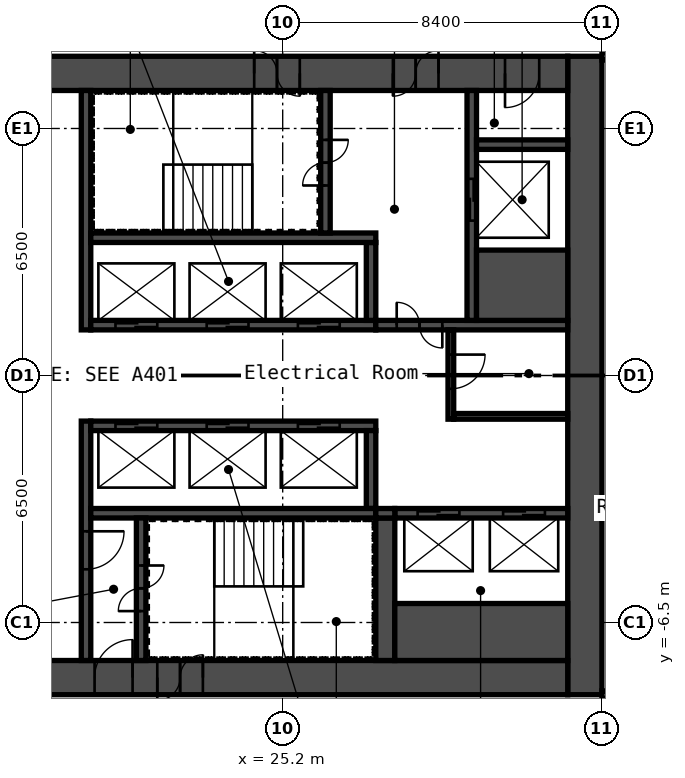
"""IFC4 building model, lengths in metres.
Left out: names, types, materials, properties, quantities, classifications, styles, units other than length and angle.
Written with IfcOpenShell. Run it as: python <this file> out.ifc"""

import sys

from ifc_helpers import new_model, si_unit, direction, frame, frame_2d, origin, place, context, subcontext, project, spatial, rectangle, extrude, element, fill, save


model = new_model("IFC4")
c1 = context("Model", 3, precision=1e-05, world=origin(), true_north=direction((0.0, 1.0)))
c2 = subcontext(c1, "Body", "Model", "MODEL_VIEW")
j1 = project(units=[si_unit("LENGTHUNIT", "METRE"), si_unit("PLANEANGLEUNIT", "RADIAN")], contexts=[c1])
p1 = place(None, origin())
s1 = spatial("IfcSite", under=j1, at=p1, CompositionType="ELEMENT")
p2 = place(p1, origin())
s2 = spatial("IfcBuilding", under=s1, at=p2, CompositionType="ELEMENT")
p3 = place(p2, origin())
s3 = spatial("IfcBuildingStorey", under=s2, at=p3, CompositionType="ELEMENT", Elevation=0.0)
p4 = place(p3, frame((33.15, -8.4, 0.0), z_axis=(0.0, 0.0, 1.0), x_axis=(0.0, 1.0, 0.0)))
e1 = element("IfcWall", 1, at=p4, inside=s3, PredefinedType="SHEAR", context=c2, shape_type="SweptSolid", body=[
    extrude(rectangle(XDim=16.8, YDim=0.9, at=frame_2d((8.4, 0.0))), origin(), (0.0, 0.0, 1.0), 8.6),
])
p5 = place(p3, frame((17.7, 7.95, 0.0), z_axis=(0.0, 0.0, 1.0), x_axis=(1.0, 0.0, 0.0)))
e2 = element("IfcWall", 2, at=p5, inside=s3, PredefinedType="SHEAR", context=c2, shape_type="SweptSolid", body=[
    extrude(rectangle(XDim=15.0, YDim=0.9, at=frame_2d((7.5, 0.0))), origin(), (0.0, 0.0, 1.0), 8.6),
])
p6 = place(p5, frame((10.4, 0.0, 0.0)))
e3 = element("IfcOpeningElement", 3, at=p6, cuts=e2, PredefinedType="OPENING", context=c2, shape_type="SweptSolid", body=[
    extrude(rectangle(XDim=1.2, YDim=2.1, at=frame_2d((0.6, 1.05))), frame((0.0, 0.46, 0.0), z_axis=(0.0, -1.0, 0.0), x_axis=(1.0, 0.0, 0.0)), (0.0, 0.0, 1.0), 0.92),
])
p7 = place(p5, frame((13.35, 0.0, 0.0)))
e4 = element("IfcOpeningElement", 4, at=p7, cuts=e2, PredefinedType="OPENING", context=c2, shape_type="SweptSolid", body=[
    extrude(rectangle(XDim=0.9, YDim=2.1, at=frame_2d((0.45, 1.05))), frame((0.0, 0.46, 0.0), z_axis=(0.0, -1.0, 0.0), x_axis=(1.0, 0.0, 0.0)), (0.0, 0.0, 1.0), 0.92),
])
p8 = place(p5, frame((6.75, 0.0, 0.0)))
e5 = element("IfcOpeningElement", 5, at=p8, cuts=e2, PredefinedType="OPENING", context=c2, shape_type="SweptSolid", body=[
    extrude(rectangle(XDim=1.2, YDim=2.1, at=frame_2d((0.6, 1.05))), frame((0.0, 0.46, 0.0), z_axis=(0.0, -1.0, 0.0), x_axis=(1.0, 0.0, 0.0)), (0.0, 0.0, 1.0), 0.92),
])
p9 = place(p3, frame((17.7, -7.95, 0.0), z_axis=(0.0, 0.0, 1.0), x_axis=(1.0, 0.0, 0.0)))
e6 = element("IfcWall", 6, at=p9, inside=s3, PredefinedType="SHEAR", context=c2, shape_type="SweptSolid", body=[
    extrude(rectangle(XDim=15.0, YDim=0.9, at=frame_2d((7.5, 0.0))), origin(), (0.0, 0.0, 1.0), 8.6),
])
p10 = place(p9, frame((2.55, 0.0, 0.0)))
e7 = element("IfcOpeningElement", 7, at=p10, cuts=e6, PredefinedType="OPENING", context=c2, shape_type="SweptSolid", body=[
    extrude(rectangle(XDim=1.0, YDim=2.1, at=frame_2d((0.5, 1.05))), frame((0.0, 0.46, 0.0), z_axis=(0.0, -1.0, 0.0), x_axis=(1.0, 0.0, 0.0)), (0.0, 0.0, 1.0), 0.92),
])
p11 = place(p9, frame((4.2, 0.0, 0.0)))
e8 = element("IfcOpeningElement", 8, at=p11, cuts=e6, PredefinedType="OPENING", context=c2, shape_type="SweptSolid", body=[
    extrude(rectangle(XDim=1.2, YDim=2.1, at=frame_2d((0.6, 1.05))), frame((0.0, 0.46, 0.0), z_axis=(0.0, -1.0, 0.0), x_axis=(1.0, 0.0, 0.0)), (0.0, 0.0, 1.0), 0.92),
])
p12 = place(p3, frame((20.025, 1.2, 0.0), z_axis=(0.0, 0.0, 1.0), x_axis=(0.0, 1.0, 0.0)))
e9 = element("IfcWall", 9, at=p12, inside=s3, PredefinedType="SHEAR", context=c2, shape_type="SweptSolid", body=[
    extrude(rectangle(XDim=6.3, YDim=0.25, at=frame_2d((3.15, 0.0))), origin(), (0.0, 0.0, 1.0), 8.6),
])
p13 = place(p3, frame((20.025, -7.5, 0.0), z_axis=(0.0, 0.0, 1.0), x_axis=(0.0, 1.0, 0.0)))
e10 = element("IfcWall", 10, at=p13, inside=s3, PredefinedType="SHEAR", context=c2, shape_type="SweptSolid", body=[
    extrude(rectangle(XDim=6.3, YDim=0.25, at=frame_2d((3.15, 0.0))), origin(), (0.0, 0.0, 1.0), 8.6),
])
p14 = place(p13, frame((2.4, 0.0, 0.0)))
e11 = element("IfcOpeningElement", 11, at=p14, cuts=e10, PredefinedType="OPENING", context=c2, shape_type="SweptSolid", body=[
    extrude(rectangle(XDim=1.0, YDim=2.1, at=frame_2d((0.5, 1.05))), frame((0.0, 0.135, 0.0), z_axis=(0.0, -1.0, 0.0), x_axis=(1.0, 0.0, 0.0)), (0.0, 0.0, 1.0), 0.27),
])
p15 = place(p3, frame((20.15, 1.325, 0.0), z_axis=(0.0, 0.0, 1.0), x_axis=(1.0, 0.0, 0.0)))
e12 = element("IfcWall", 12, at=p15, inside=s3, PredefinedType="SHEAR", context=c2, shape_type="SweptSolid", body=[
    extrude(rectangle(XDim=7.5, YDim=0.25, at=frame_2d((3.75, 0.0))), origin(), (0.0, 0.0, 1.0), 8.6),
])
p16 = place(p15, frame((0.65, 0.0, 0.0)))
e13 = element("IfcOpeningElement", 13, at=p16, cuts=e12, PredefinedType="OPENING", context=c2, shape_type="SweptSolid", body=[
    extrude(rectangle(XDim=1.1, YDim=2.1, at=frame_2d((0.55, 1.05))), frame((0.0, 0.135, 0.0), z_axis=(0.0, -1.0, 0.0), x_axis=(1.0, 0.0, 0.0)), (0.0, 0.0, 1.0), 0.27),
])
p17 = place(p15, frame((3.05, 0.0, 0.0)))
e14 = element("IfcOpeningElement", 14, at=p17, cuts=e12, PredefinedType="OPENING", context=c2, shape_type="SweptSolid", body=[
    extrude(rectangle(XDim=1.1, YDim=2.1, at=frame_2d((0.55, 1.05))), frame((0.0, 0.135, 0.0), z_axis=(0.0, -1.0, 0.0), x_axis=(1.0, 0.0, 0.0)), (0.0, 0.0, 1.0), 0.27),
])
p18 = place(p15, frame((5.45, 0.0, 0.0)))
e15 = element("IfcOpeningElement", 15, at=p18, cuts=e12, PredefinedType="OPENING", context=c2, shape_type="SweptSolid", body=[
    extrude(rectangle(XDim=1.1, YDim=2.1, at=frame_2d((0.55, 1.05))), frame((0.0, 0.135, 0.0), z_axis=(0.0, -1.0, 0.0), x_axis=(1.0, 0.0, 0.0)), (0.0, 0.0, 1.0), 0.27),
])
p19 = place(p3, frame((27.525, 1.45, 0.0), z_axis=(0.0, 0.0, 1.0), x_axis=(0.0, 1.0, 0.0)))
e16 = element("IfcWall", 16, at=p19, inside=s3, PredefinedType="SHEAR", context=c2, shape_type="SweptSolid", body=[
    extrude(rectangle(XDim=2.05, YDim=0.25, at=frame_2d((1.025, 0.0))), origin(), (0.0, 0.0, 1.0), 8.6),
])
p20 = place(p3, frame((20.15, 3.625, 0.0), z_axis=(0.0, 0.0, 1.0), x_axis=(1.0, 0.0, 0.0)))
e17 = element("IfcWall", 17, at=p20, inside=s3, PredefinedType="SHEAR", context=c2, shape_type="SweptSolid", body=[
    extrude(rectangle(XDim=7.5, YDim=0.25, at=frame_2d((3.75, 0.0))), origin(), (0.0, 0.0, 1.0), 8.6),
])
p21 = place(p3, frame((26.325, 3.75, 0.0), z_axis=(0.0, 0.0, 1.0), x_axis=(0.0, 1.0, 0.0)))
e18 = element("IfcWall", 18, at=p21, inside=s3, PredefinedType="SHEAR", context=c2, shape_type="SweptSolid", body=[
    extrude(rectangle(XDim=3.75, YDim=0.25, at=frame_2d((1.875, 0.0))), origin(), (0.0, 0.0, 1.0), 8.6),
])
p22 = place(p21, frame((1.25, 0.0, 0.0)))
e19 = element("IfcOpeningElement", 19, at=p22, cuts=e18, PredefinedType="OPENING", context=c2, shape_type="SweptSolid", body=[
    extrude(rectangle(XDim=1.2, YDim=2.1, at=frame_2d((0.6, 1.05))), frame((0.0, 0.135, 0.0), z_axis=(0.0, -1.0, 0.0), x_axis=(1.0, 0.0, 0.0)), (0.0, 0.0, 1.0), 0.27),
])
p23 = place(p3, frame((27.65, 1.325, 0.0), z_axis=(0.0, 0.0, 1.0), x_axis=(1.0, 0.0, 0.0)))
e20 = element("IfcWall", 20, at=p23, inside=s3, PredefinedType="SHEAR", context=c2, shape_type="SweptSolid", body=[
    extrude(rectangle(XDim=5.05, YDim=0.25, at=frame_2d((2.525, 0.0))), origin(), (0.0, 0.0, 1.0), 8.6),
])
p24 = place(p23, frame((0.55, 0.0, 0.0)))
e21 = element("IfcOpeningElement", 21, at=p24, cuts=e20, PredefinedType="OPENING", context=c2, shape_type="SweptSolid", body=[
    extrude(rectangle(XDim=1.2, YDim=2.1, at=frame_2d((0.6, 1.05))), frame((0.0, 0.135, 0.0), z_axis=(0.0, -1.0, 0.0), x_axis=(1.0, 0.0, 0.0)), (0.0, 0.0, 1.0), 0.27),
])
p25 = place(p3, frame((30.175, 1.45, 0.0), z_axis=(0.0, 0.0, 1.0), x_axis=(0.0, 1.0, 0.0)))
e22 = element("IfcWall", 22, at=p25, inside=s3, PredefinedType="SHEAR", context=c2, shape_type="SweptSolid", body=[
    extrude(rectangle(XDim=6.05, YDim=0.25, at=frame_2d((3.025, 0.0))), origin(), (0.0, 0.0, 1.0), 8.6),
])
p26 = place(p25, frame((2.625, 0.0, 0.0)))
e23 = element("IfcOpeningElement", 23, at=p26, cuts=e22, PredefinedType="OPENING", context=c2, shape_type="SweptSolid", body=[
    extrude(rectangle(XDim=1.1, YDim=2.1, at=frame_2d((0.55, 1.05))), frame((0.0, 0.135, 0.0), z_axis=(0.0, -1.0, 0.0), x_axis=(1.0, 0.0, 0.0)), (0.0, 0.0, 1.0), 0.27),
])
p27 = place(p3, frame((30.3, 2.375, 0.0), z_axis=(0.0, 0.0, 1.0), x_axis=(1.0, 0.0, 0.0)))
e24 = element("IfcWall", 24, at=p27, inside=s3, PredefinedType="SHEAR", context=c2, shape_type="SweptSolid", body=[
    extrude(rectangle(XDim=2.4, YDim=1.85, at=frame_2d((1.2, 0.0))), origin(), (0.0, 0.0, 1.0), 8.6),
])
p28 = place(p3, frame((30.3, 6.075, 0.0), z_axis=(0.0, 0.0, 1.0), x_axis=(1.0, 0.0, 0.0)))
e25 = element("IfcWall", 25, at=p28, inside=s3, PredefinedType="SHEAR", context=c2, shape_type="SweptSolid", body=[
    extrude(rectangle(XDim=2.4, YDim=0.25, at=frame_2d((1.2, 0.0))), origin(), (0.0, 0.0, 1.0), 8.6),
])
p29 = place(p3, frame((20.15, -1.325, 0.0), z_axis=(0.0, 0.0, 1.0), x_axis=(1.0, 0.0, 0.0)))
e26 = element("IfcWall", 26, at=p29, inside=s3, PredefinedType="SHEAR", context=c2, shape_type="SweptSolid", body=[
    extrude(rectangle(XDim=7.5, YDim=0.25, at=frame_2d((3.75, 0.0))), origin(), (0.0, 0.0, 1.0), 8.6),
])
p30 = place(p29, frame((0.65, 0.0, 0.0)))
e27 = element("IfcOpeningElement", 27, at=p30, cuts=e26, PredefinedType="OPENING", context=c2, shape_type="SweptSolid", body=[
    extrude(rectangle(XDim=1.1, YDim=2.1, at=frame_2d((0.55, 1.05))), frame((0.0, 0.135, 0.0), z_axis=(0.0, -1.0, 0.0), x_axis=(1.0, 0.0, 0.0)), (0.0, 0.0, 1.0), 0.27),
])
p31 = place(p29, frame((3.05, 0.0, 0.0)))
e28 = element("IfcOpeningElement", 28, at=p31, cuts=e26, PredefinedType="OPENING", context=c2, shape_type="SweptSolid", body=[
    extrude(rectangle(XDim=1.1, YDim=2.1, at=frame_2d((0.55, 1.05))), frame((0.0, 0.135, 0.0), z_axis=(0.0, -1.0, 0.0), x_axis=(1.0, 0.0, 0.0)), (0.0, 0.0, 1.0), 0.27),
])
p32 = place(p29, frame((5.45, 0.0, 0.0)))
e29 = element("IfcOpeningElement", 29, at=p32, cuts=e26, PredefinedType="OPENING", context=c2, shape_type="SweptSolid", body=[
    extrude(rectangle(XDim=1.1, YDim=2.1, at=frame_2d((0.55, 1.05))), frame((0.0, 0.135, 0.0), z_axis=(0.0, -1.0, 0.0), x_axis=(1.0, 0.0, 0.0)), (0.0, 0.0, 1.0), 0.27),
])
p33 = place(p3, frame((27.525, -3.5, 0.0), z_axis=(0.0, 0.0, 1.0), x_axis=(0.0, 1.0, 0.0)))
e30 = element("IfcWall", 30, at=p33, inside=s3, PredefinedType="SHEAR", context=c2, shape_type="SweptSolid", body=[
    extrude(rectangle(XDim=2.05, YDim=0.25, at=frame_2d((1.025, 0.0))), origin(), (0.0, 0.0, 1.0), 8.6),
])
p34 = place(p3, frame((20.15, -3.625, 0.0), z_axis=(0.0, 0.0, 1.0), x_axis=(1.0, 0.0, 0.0)))
e31 = element("IfcWall", 31, at=p34, inside=s3, PredefinedType="SHEAR", context=c2, shape_type="SweptSolid", body=[
    extrude(rectangle(XDim=7.5, YDim=0.25, at=frame_2d((3.75, 0.0))), origin(), (0.0, 0.0, 1.0), 8.6),
])
p35 = place(p3, frame((21.475, -7.5, 0.0), z_axis=(0.0, 0.0, 1.0), x_axis=(0.0, 1.0, 0.0)))
e32 = element("IfcWall", 32, at=p35, inside=s3, PredefinedType="SHEAR", context=c2, shape_type="SweptSolid", body=[
    extrude(rectangle(XDim=3.75, YDim=0.25, at=frame_2d((1.875, 0.0))), origin(), (0.0, 0.0, 1.0), 8.6),
])
p36 = place(p35, frame((1.3, 0.0, 0.0)))
e33 = element("IfcOpeningElement", 33, at=p36, cuts=e32, PredefinedType="OPENING", context=c2, shape_type="SweptSolid", body=[
    extrude(rectangle(XDim=1.2, YDim=2.1, at=frame_2d((0.6, 1.05))), frame((0.0, 0.135, 0.0), z_axis=(0.0, -1.0, 0.0), x_axis=(1.0, 0.0, 0.0)), (0.0, 0.0, 1.0), 0.27),
])
p37 = place(p3, frame((27.9, -7.5, 0.0), z_axis=(0.0, 0.0, 1.0), x_axis=(0.0, 1.0, 0.0)))
e34 = element("IfcWall", 34, at=p37, inside=s3, PredefinedType="SHEAR", context=c2, shape_type="SweptSolid", body=[
    extrude(rectangle(XDim=3.75, YDim=0.5, at=frame_2d((1.875, 0.0))), origin(), (0.0, 0.0, 1.0), 8.6),
])
p38 = place(p3, frame((28.15, -3.625, 0.0), z_axis=(0.0, 0.0, 1.0), x_axis=(1.0, 0.0, 0.0)))
e35 = element("IfcWall", 35, at=p38, inside=s3, PredefinedType="SHEAR", context=c2, shape_type="SweptSolid", body=[
    extrude(rectangle(XDim=4.55, YDim=0.25, at=frame_2d((2.275, 0.0))), origin(), (0.0, 0.0, 1.0), 8.6),
])
p39 = place(p38, frame((0.6, 0.0, 0.0)))
e36 = element("IfcOpeningElement", 36, at=p39, cuts=e35, PredefinedType="OPENING", context=c2, shape_type="SweptSolid", body=[
    extrude(rectangle(XDim=1.1, YDim=2.1, at=frame_2d((0.55, 1.05))), frame((0.0, 0.135, 0.0), z_axis=(0.0, -1.0, 0.0), x_axis=(1.0, 0.0, 0.0)), (0.0, 0.0, 1.0), 0.27),
])
p40 = place(p38, frame((2.85, 0.0, 0.0)))
e37 = element("IfcOpeningElement", 37, at=p40, cuts=e35, PredefinedType="OPENING", context=c2, shape_type="SweptSolid", body=[
    extrude(rectangle(XDim=1.1, YDim=2.1, at=frame_2d((0.55, 1.05))), frame((0.0, 0.135, 0.0), z_axis=(0.0, -1.0, 0.0), x_axis=(1.0, 0.0, 0.0)), (0.0, 0.0, 1.0), 0.27),
])
p41 = place(p3, frame((28.15, -6.75, 0.0), z_axis=(0.0, 0.0, 1.0), x_axis=(1.0, 0.0, 0.0)))
e38 = element("IfcWall", 38, at=p41, inside=s3, PredefinedType="SHEAR", context=c2, shape_type="SweptSolid", body=[
    extrude(rectangle(XDim=4.55, YDim=1.5, at=frame_2d((2.275, 0.0))), origin(), (0.0, 0.0, 1.0), 8.6),
])
p42 = place(p3, frame((27.65, -3.625, 0.0), z_axis=(0.0, 0.0, 1.0), x_axis=(1.0, 0.0, 0.0)))
e39 = element("IfcWall", 39, at=p42, inside=s3, PredefinedType="SHEAR", context=c2, shape_type="SweptSolid", body=[
    extrude(rectangle(XDim=0.5, YDim=0.25, at=frame_2d((0.25, 0.0))), origin(), (0.0, 0.0, 1.0), 8.6),
])
p43 = place(p3, frame((29.625, -1.15, 0.0), z_axis=(0.0, 0.0, 1.0), x_axis=(0.0, 1.0, 0.0)))
e40 = element("IfcWall", 40, at=p43, inside=s3, PredefinedType="PARTITIONING", context=c2, shape_type="SweptSolid", body=[
    extrude(rectangle(XDim=2.35, YDim=0.15, at=frame_2d((1.175, 0.0))), origin(), (0.0, 0.0, 1.0), 8.6),
])
p44 = place(p43, frame((0.8, 0.0, 0.0)))
e41 = element("IfcOpeningElement", 41, at=p44, cuts=e40, PredefinedType="OPENING", context=c2, shape_type="SweptSolid", body=[
    extrude(rectangle(XDim=0.9, YDim=2.1, at=frame_2d((0.45, 1.05))), frame((0.0, 0.085, 0.0), z_axis=(0.0, -1.0, 0.0), x_axis=(1.0, 0.0, 0.0)), (0.0, 0.0, 1.0), 0.17),
])
p45 = place(p3, frame((29.7, -1.075, 0.0), z_axis=(0.0, 0.0, 1.0), x_axis=(1.0, 0.0, 0.0)))
e42 = element("IfcWall", 42, at=p45, inside=s3, PredefinedType="PARTITIONING", context=c2, shape_type="SweptSolid", body=[
    extrude(rectangle(XDim=3.0, YDim=0.15, at=frame_2d((1.5, 0.0))), origin(), (0.0, 0.0, 1.0), 8.6),
])
for number, where, z_axis, x_axis in (
    (43, (33.6, -8.4, 0.0), (0.0, 0.0, 1.0), (1.0, 0.0, 0.0)),
    (44, (39.0, 8.4, 0.0), (0.0, 0.0, 1.0), (-1.0, 0.0, 0.0)),
):
    element("IfcWall", number, at=place(p3, frame(where, z_axis=z_axis, x_axis=x_axis)), inside=s3, PredefinedType="PARTITIONING", context=c2, shape_type="SweptSolid", body=[
        extrude(rectangle(XDim=5.4, YDim=0.2, at=frame_2d((2.7, 0.0))), origin(), (0.0, 0.0, 1.0), 8.6),
    ])
p46 = place(p6, origin())
e45 = element("IfcDoor", 45, at=p46, inside=s3, OperationType="DOUBLE_DOOR_SINGLE_SWING", PredefinedType="DOOR", context=c2, shape_type="SweptSolid", body=[
    extrude(rectangle(XDim=1.2, YDim=2.1, at=frame_2d((0.6, 1.05))), frame((0.0, 0.025, 0.0), z_axis=(0.0, -1.0, 0.0), x_axis=(1.0, 0.0, 0.0)), (0.0, 0.0, 1.0), 0.05),
])
fill(e3, e45)
p47 = place(p7, origin())
e46 = element("IfcDoor", 46, at=p47, inside=s3, OperationType="SINGLE_SWING_LEFT", PredefinedType="DOOR", context=c2, shape_type="SweptSolid", body=[
    extrude(rectangle(XDim=0.9, YDim=2.1, at=frame_2d((0.45, 1.05))), frame((0.0, 0.025, 0.0), z_axis=(0.0, -1.0, 0.0), x_axis=(1.0, 0.0, 0.0)), (0.0, 0.0, 1.0), 0.05),
])
fill(e4, e46)
p48 = place(p10, origin())
e47 = element("IfcDoor", 47, at=p48, inside=s3, OperationType="SINGLE_SWING_LEFT", PredefinedType="DOOR", context=c2, shape_type="SweptSolid", body=[
    extrude(rectangle(XDim=1.0, YDim=2.1, at=frame_2d((0.5, 1.05))), frame((0.0, 0.025, 0.0), z_axis=(0.0, -1.0, 0.0), x_axis=(1.0, 0.0, 0.0)), (0.0, 0.0, 1.0), 0.05),
])
fill(e7, e47)
p49 = place(p8, origin())
e48 = element("IfcDoor", 48, at=p49, inside=s3, OperationType="DOUBLE_DOOR_SINGLE_SWING", PredefinedType="DOOR", context=c2, shape_type="SweptSolid", body=[
    extrude(rectangle(XDim=1.2, YDim=2.1, at=frame_2d((0.6, 1.05))), frame((0.0, 0.025, 0.0), z_axis=(0.0, -1.0, 0.0), x_axis=(1.0, 0.0, 0.0)), (0.0, 0.0, 1.0), 0.05),
])
fill(e5, e48)
p50 = place(p11, frame((1.2, 0.0, 0.0), z_axis=(0.0, 0.0, 1.0), x_axis=(-1.0, 0.0, 0.0)))
e49 = element("IfcDoor", 49, at=p50, inside=s3, OperationType="DOUBLE_DOOR_SINGLE_SWING", PredefinedType="DOOR", context=c2, shape_type="SweptSolid", body=[
    extrude(rectangle(XDim=1.2, YDim=2.1, at=frame_2d((0.6, 1.05))), frame((0.0, 0.025, 0.0), z_axis=(0.0, -1.0, 0.0), x_axis=(1.0, 0.0, 0.0)), (0.0, 0.0, 1.0), 0.05),
])
fill(e8, e49)
p51 = place(p22, origin())
e50 = element("IfcDoor", 50, at=p51, inside=s3, OperationType="DOUBLE_DOOR_SINGLE_SWING", PredefinedType="DOOR", context=c2, shape_type="SweptSolid", body=[
    extrude(rectangle(XDim=1.2, YDim=2.1, at=frame_2d((0.6, 1.05))), frame((0.0, 0.025, 0.0), z_axis=(0.0, -1.0, 0.0), x_axis=(1.0, 0.0, 0.0)), (0.0, 0.0, 1.0), 0.05),
])
fill(e19, e50)
p52 = place(p36, origin())
e51 = element("IfcDoor", 51, at=p52, inside=s3, OperationType="DOUBLE_DOOR_SINGLE_SWING", PredefinedType="DOOR", context=c2, shape_type="SweptSolid", body=[
    extrude(rectangle(XDim=1.2, YDim=2.1, at=frame_2d((0.6, 1.05))), frame((0.0, 0.025, 0.0), z_axis=(0.0, -1.0, 0.0), x_axis=(1.0, 0.0, 0.0)), (0.0, 0.0, 1.0), 0.05),
])
fill(e33, e51)
p53 = place(p14, origin())
e52 = element("IfcDoor", 52, at=p53, inside=s3, OperationType="SINGLE_SWING_RIGHT", PredefinedType="DOOR", context=c2, shape_type="SweptSolid", body=[
    extrude(rectangle(XDim=1.0, YDim=2.1, at=frame_2d((0.5, 1.05))), frame((0.0, 0.025, 0.0), z_axis=(0.0, -1.0, 0.0), x_axis=(1.0, 0.0, 0.0)), (0.0, 0.0, 1.0), 0.05),
])
fill(e11, e52)
p54 = place(p24, origin())
e53 = element("IfcDoor", 53, at=p54, inside=s3, OperationType="DOUBLE_DOOR_SINGLE_SWING", PredefinedType="DOOR", context=c2, shape_type="SweptSolid", body=[
    extrude(rectangle(XDim=1.2, YDim=2.1, at=frame_2d((0.6, 1.05))), frame((0.0, 0.025, 0.0), z_axis=(0.0, -1.0, 0.0), x_axis=(1.0, 0.0, 0.0)), (0.0, 0.0, 1.0), 0.05),
])
fill(e21, e53)
p55 = place(p44, origin())
e54 = element("IfcDoor", 54, at=p55, inside=s3, OperationType="SINGLE_SWING_RIGHT", PredefinedType="DOOR", context=c2, shape_type="SweptSolid", body=[
    extrude(rectangle(XDim=0.9, YDim=2.1, at=frame_2d((0.45, 1.05))), frame((0.0, 0.025, 0.0), z_axis=(0.0, -1.0, 0.0), x_axis=(1.0, 0.0, 0.0)), (0.0, 0.0, 1.0), 0.05),
])
fill(e41, e54)
p56 = place(p16, origin())
e55 = element("IfcDoor", 55, at=p56, inside=s3, OperationType="DOUBLE_DOOR_SLIDING", PredefinedType="DOOR", context=c2, shape_type="SweptSolid", body=[
    extrude(rectangle(XDim=1.1, YDim=2.1, at=frame_2d((0.55, 1.05))), frame((0.0, 0.025, 0.0), z_axis=(0.0, -1.0, 0.0), x_axis=(1.0, 0.0, 0.0)), (0.0, 0.0, 1.0), 0.05),
])
fill(e13, e55)
p57 = place(p17, origin())
e56 = element("IfcDoor", 56, at=p57, inside=s3, OperationType="DOUBLE_DOOR_SLIDING", PredefinedType="DOOR", context=c2, shape_type="SweptSolid", body=[
    extrude(rectangle(XDim=1.1, YDim=2.1, at=frame_2d((0.55, 1.05))), frame((0.0, 0.025, 0.0), z_axis=(0.0, -1.0, 0.0), x_axis=(1.0, 0.0, 0.0)), (0.0, 0.0, 1.0), 0.05),
])
fill(e14, e56)
p58 = place(p18, origin())
e57 = element("IfcDoor", 57, at=p58, inside=s3, OperationType="DOUBLE_DOOR_SLIDING", PredefinedType="DOOR", context=c2, shape_type="SweptSolid", body=[
    extrude(rectangle(XDim=1.1, YDim=2.1, at=frame_2d((0.55, 1.05))), frame((0.0, 0.025, 0.0), z_axis=(0.0, -1.0, 0.0), x_axis=(1.0, 0.0, 0.0)), (0.0, 0.0, 1.0), 0.05),
])
fill(e15, e57)
p59 = place(p30, origin())
e58 = element("IfcDoor", 58, at=p59, inside=s3, OperationType="DOUBLE_DOOR_SLIDING", PredefinedType="DOOR", context=c2, shape_type="SweptSolid", body=[
    extrude(rectangle(XDim=1.1, YDim=2.1, at=frame_2d((0.55, 1.05))), frame((0.0, 0.025, 0.0), z_axis=(0.0, -1.0, 0.0), x_axis=(1.0, 0.0, 0.0)), (0.0, 0.0, 1.0), 0.05),
])
fill(e27, e58)
p60 = place(p31, origin())
e59 = element("IfcDoor", 59, at=p60, inside=s3, OperationType="DOUBLE_DOOR_SLIDING", PredefinedType="DOOR", context=c2, shape_type="SweptSolid", body=[
    extrude(rectangle(XDim=1.1, YDim=2.1, at=frame_2d((0.55, 1.05))), frame((0.0, 0.025, 0.0), z_axis=(0.0, -1.0, 0.0), x_axis=(1.0, 0.0, 0.0)), (0.0, 0.0, 1.0), 0.05),
])
fill(e28, e59)
p61 = place(p32, origin())
e60 = element("IfcDoor", 60, at=p61, inside=s3, OperationType="DOUBLE_DOOR_SLIDING", PredefinedType="DOOR", context=c2, shape_type="SweptSolid", body=[
    extrude(rectangle(XDim=1.1, YDim=2.1, at=frame_2d((0.55, 1.05))), frame((0.0, 0.025, 0.0), z_axis=(0.0, -1.0, 0.0), x_axis=(1.0, 0.0, 0.0)), (0.0, 0.0, 1.0), 0.05),
])
fill(e29, e60)
p62 = place(p26, origin())
e61 = element("IfcDoor", 61, at=p62, inside=s3, OperationType="DOUBLE_DOOR_SLIDING", PredefinedType="DOOR", context=c2, shape_type="SweptSolid", body=[
    extrude(rectangle(XDim=1.1, YDim=2.1, at=frame_2d((0.55, 1.05))), frame((0.0, 0.025, 0.0), z_axis=(0.0, -1.0, 0.0), x_axis=(1.0, 0.0, 0.0)), (0.0, 0.0, 1.0), 0.05),
])
fill(e23, e61)
p63 = place(p39, origin())
e62 = element("IfcDoor", 62, at=p63, inside=s3, OperationType="DOUBLE_DOOR_SLIDING", PredefinedType="DOOR", context=c2, shape_type="SweptSolid", body=[
    extrude(rectangle(XDim=1.1, YDim=2.1, at=frame_2d((0.55, 1.05))), frame((0.0, 0.025, 0.0), z_axis=(0.0, -1.0, 0.0), x_axis=(1.0, 0.0, 0.0)), (0.0, 0.0, 1.0), 0.05),
])
fill(e36, e62)
p64 = place(p40, origin())
e63 = element("IfcDoor", 63, at=p64, inside=s3, OperationType="DOUBLE_DOOR_SLIDING", PredefinedType="DOOR", context=c2, shape_type="SweptSolid", body=[
    extrude(rectangle(XDim=1.1, YDim=2.1, at=frame_2d((0.55, 1.05))), frame((0.0, 0.025, 0.0), z_axis=(0.0, -1.0, 0.0), x_axis=(1.0, 0.0, 0.0)), (0.0, 0.0, 1.0), 0.05),
])
fill(e37, e63)
save(model, sys.argv[1])
